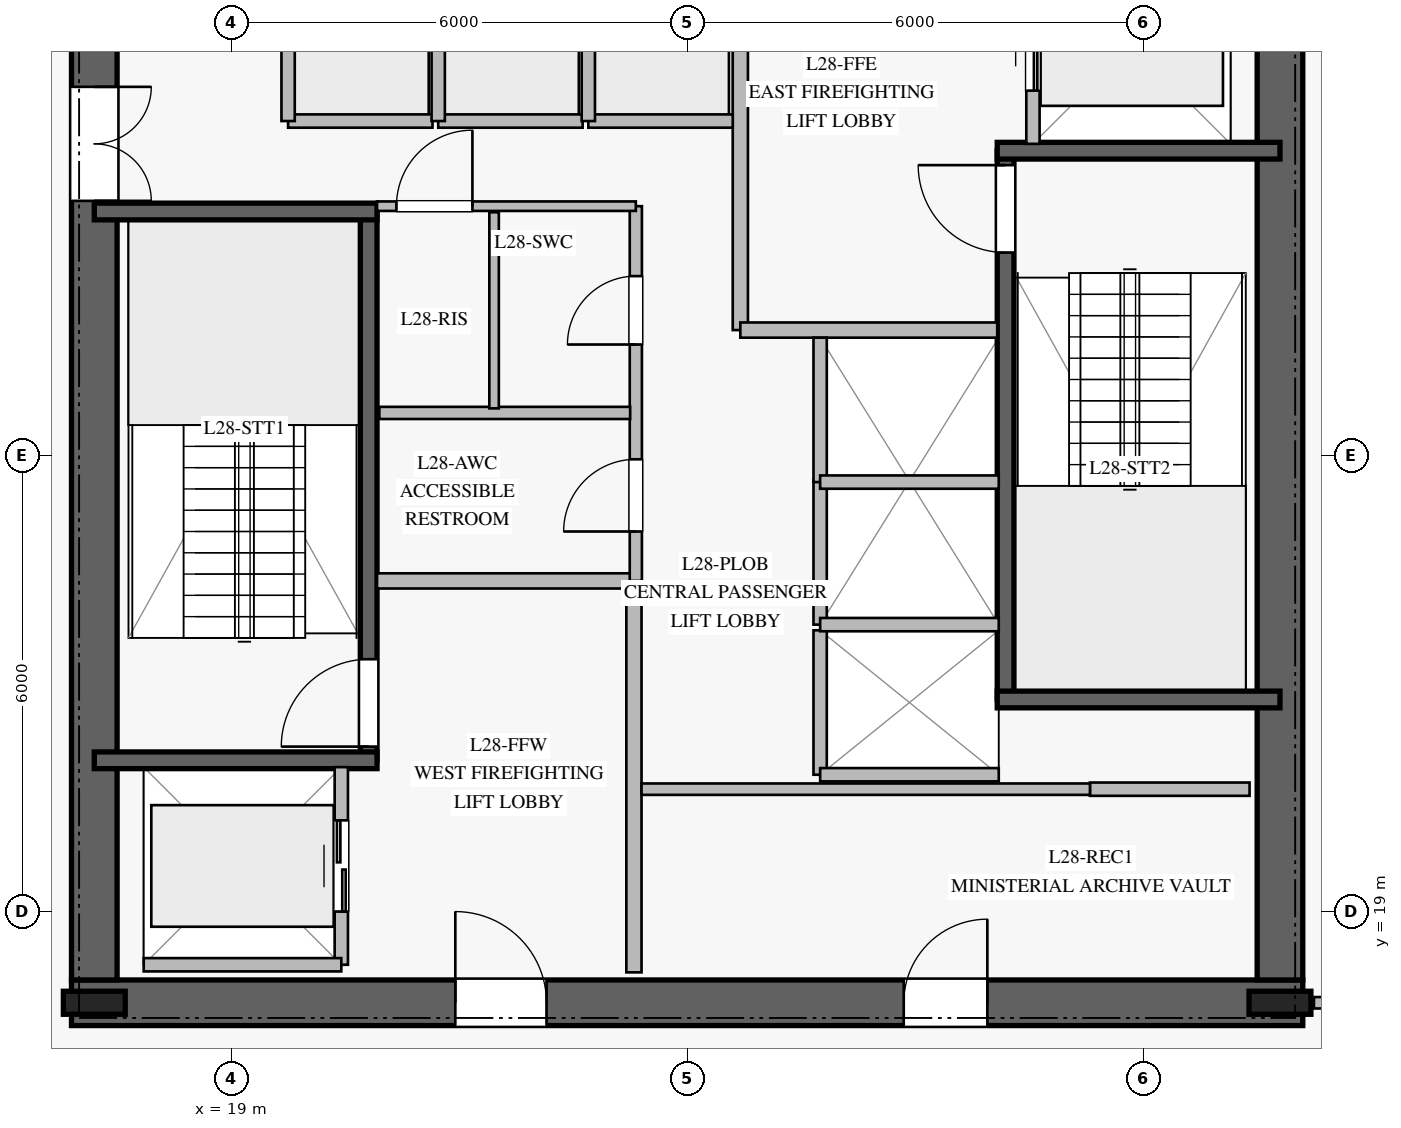
"""IFC4 building model, lengths in metres.
Left out: names, types, materials, properties, quantities, classifications, styles, units other than length and angle.
Written with IfcOpenShell. Run it as: python <this file> out.ifc"""

import sys

from ifc_helpers import new_model, si_unit, direction, frame, frame_2d, origin, origin_2d, place, context, subcontext, project, spatial, rectangle, i_section, extrude, element, fill, save


model = new_model("IFC4")
c1 = context("Model", 3, precision=1e-05, world=origin(), true_north=direction((0.0, 1.0)))
c2 = subcontext(c1, "Body", "Model", "MODEL_VIEW")
j1 = project(units=[si_unit("LENGTHUNIT", "METRE"), si_unit("PLANEANGLEUNIT", "RADIAN")], contexts=[c1])
p1 = place(None, origin())
s1 = spatial("IfcSite", under=j1, at=p1, CompositionType="ELEMENT")
p2 = place(p1, origin())
s2 = spatial("IfcBuilding", under=s1, at=p2, CompositionType="ELEMENT")
p3 = place(p2, frame((0.0, 0.0, 118.4)))
s3 = spatial("IfcBuildingStorey", under=s2, at=p3, CompositionType="ELEMENT", Elevation=118.4)
p4 = place(p3, frame((16.9, 17.8, 0.0), z_axis=(0.0, 0.0, 1.0), x_axis=(1.0, 0.0, 0.0)))
e1 = element("IfcWall", 1, at=p4, inside=s3, PredefinedType="SHEAR", context=c2, shape_type="SweptSolid", body=[
    extrude(rectangle(XDim=16.2, YDim=0.6, at=frame_2d((8.1, 0.0))), origin(), (0.0, 0.0, 1.0), 3.76),
])
p5 = place(p4, frame((5.05, 0.0, 0.0)))
e2 = element("IfcOpeningElement", 2, at=p5, cuts=e1, PredefinedType="OPENING", context=c2, shape_type="SweptSolid", body=[
    extrude(rectangle(XDim=1.2, YDim=2.25, at=frame_2d((0.6, 1.125))), frame((0.0, 0.31, 0.0), z_axis=(0.0, -1.0, 0.0), x_axis=(1.0, 0.0, 0.0)), (0.0, 0.0, 1.0), 0.62),
])
p6 = place(p4, frame((10.95, 0.0, 0.0)))
e3 = element("IfcOpeningElement", 3, at=p6, cuts=e1, PredefinedType="OPENING", context=c2, shape_type="SweptSolid", body=[
    extrude(rectangle(XDim=1.1, YDim=2.2, at=frame_2d((0.55, 1.1))), frame((0.0, 0.31, 0.0), z_axis=(0.0, -1.0, 0.0), x_axis=(1.0, 0.0, 0.0)), (0.0, 0.0, 1.0), 0.62),
])
p7 = place(p3, frame((17.2, 31.9, 0.0), z_axis=(0.0, 0.0, 1.0), x_axis=(0.0, -1.0, 0.0)))
e4 = element("IfcWall", 4, at=p7, inside=s3, PredefinedType="SHEAR", context=c2, shape_type="SweptSolid", body=[
    extrude(rectangle(XDim=13.8, YDim=0.6, at=frame_2d((6.9, 0.0))), origin(), (0.0, 0.0, 1.0), 3.76),
])
p8 = place(p7, frame((2.05, 0.0, 0.0)))
e5 = element("IfcOpeningElement", 5, at=p8, cuts=e4, PredefinedType="OPENING", context=c2, shape_type="SweptSolid", body=[
    extrude(rectangle(XDim=1.5, YDim=2.2, at=frame_2d((0.75, 1.1))), frame((0.0, 0.31, 0.0), z_axis=(0.0, -1.0, 0.0), x_axis=(1.0, 0.0, 0.0)), (0.0, 0.0, 1.0), 0.62),
])
p9 = place(p3, frame((32.8, 18.1, 0.0), z_axis=(0.0, 0.0, 1.0), x_axis=(0.0, 1.0, 0.0)))
e6 = element("IfcWall", 6, at=p9, inside=s3, PredefinedType="SHEAR", context=c2, shape_type="SweptSolid", body=[
    extrude(rectangle(XDim=13.8, YDim=0.6, at=frame_2d((6.9, 0.0))), origin(), (0.0, 0.0, 1.0), 3.76),
])
for number, where, z_axis, x_axis in (
    (7, (17.2, 17.8, 0.0), (0.0, 0.0, 1.0), (1.0, 0.0, 0.0)),
    (8, (32.8, 17.8, 0.0), (0.0, 0.0, 1.0), (1.0, 0.0, 0.0)),
):
    element("IfcColumn", number, at=place(p3, frame(where, z_axis=z_axis, x_axis=x_axis)), inside=s3, PredefinedType="COLUMN", context=c2, shape_type="SweptSolid", body=[
        extrude(i_section(OverallWidth=0.303, OverallDepth=0.814, WebThickness=0.021, FlangeThickness=0.04, at=origin_2d()), origin(), (0.0, 0.0, 1.0), 4.0),
    ])
p10 = place(p3, frame((20.81, 20.99, 0.0), z_axis=(0.0, 0.0, 1.0), x_axis=(0.0, 1.0, 0.0)))
e9 = element("IfcWall", 9, at=p10, inside=s3, PredefinedType="SOLIDWALL", context=c2, shape_type="SweptSolid", body=[
    extrude(rectangle(XDim=7.22, YDim=0.22, at=frame_2d((3.61, 0.0))), origin(), (0.0, 0.0, 1.0), 3.76),
])
p11 = place(p10, frame((0.18, 0.0, 0.0)))
e10 = element("IfcOpeningElement", 10, at=p11, cuts=e9, PredefinedType="OPENING", context=c2, shape_type="SweptSolid", body=[
    extrude(rectangle(XDim=1.15, YDim=2.2, at=frame_2d((0.575, 1.1))), frame((0.0, 0.12, 0.0), z_axis=(0.0, -1.0, 0.0), x_axis=(1.0, 0.0, 0.0)), (0.0, 0.0, 1.0), 0.24),
])
for number, where, z_axis, x_axis in (
    (11, (17.2, 20.99, 0.0), (0.0, 0.0, 1.0), (1.0, 0.0, 0.0)),
    (12, (17.2, 28.21, 0.0), (0.0, 0.0, 1.0), (1.0, 0.0, 0.0)),
):
    element("IfcWall", number, at=place(p3, frame(where, z_axis=z_axis, x_axis=x_axis)), inside=s3, PredefinedType="SOLIDWALL", context=c2, shape_type="SweptSolid", body=[
        extrude(rectangle(XDim=3.72, YDim=0.22, at=frame_2d((1.86, 0.0))), origin(), (0.0, 0.0, 1.0), 3.76),
    ])
p12 = place(p3, frame((29.19, 21.79, 0.0), z_axis=(0.0, 0.0, 1.0), x_axis=(0.0, 1.0, 0.0)))
e13 = element("IfcWall", 13, at=p12, inside=s3, PredefinedType="SOLIDWALL", context=c2, shape_type="SweptSolid", body=[
    extrude(rectangle(XDim=7.22, YDim=0.22, at=frame_2d((3.61, 0.0))), origin(), (0.0, 0.0, 1.0), 3.76),
])
p13 = place(p12, frame((5.88, 0.0, 0.0)))
e14 = element("IfcOpeningElement", 14, at=p13, cuts=e13, PredefinedType="OPENING", context=c2, shape_type="SweptSolid", body=[
    extrude(rectangle(XDim=1.15, YDim=2.2, at=frame_2d((0.575, 1.1))), frame((0.0, 0.12, 0.0), z_axis=(0.0, -1.0, 0.0), x_axis=(1.0, 0.0, 0.0)), (0.0, 0.0, 1.0), 0.24),
])
for number, where, z_axis, x_axis in (
    (15, (29.08, 21.79, 0.0), (0.0, 0.0, 1.0), (1.0, 0.0, 0.0)),
    (16, (29.08, 29.01, 0.0), (0.0, 0.0, 1.0), (1.0, 0.0, 0.0)),
):
    element("IfcWall", number, at=place(p3, frame(where, z_axis=z_axis, x_axis=x_axis)), inside=s3, PredefinedType="SOLIDWALL", context=c2, shape_type="SweptSolid", body=[
        extrude(rectangle(XDim=3.72, YDim=0.22, at=frame_2d((1.86, 0.0))), origin(), (0.0, 0.0, 1.0), 3.76),
    ])
p14 = place(p3, frame((24.3, 18.2, 0.0), z_axis=(0.0, 0.0, 1.0), x_axis=(0.0, 1.0, 0.0)))
e17 = element("IfcWall", 17, at=p14, inside=s3, PredefinedType="PARTITIONING", context=c2, shape_type="SweptSolid", body=[
    extrude(rectangle(XDim=5.15, YDim=0.2, at=frame_2d((2.575, 0.0))), origin(), (0.0, 0.0, 1.0), 3.76),
])
p15 = place(p3, frame((20.92, 23.35, 0.0), z_axis=(0.0, 0.0, 1.0), x_axis=(1.0, 0.0, 0.0)))
e18 = element("IfcWall", 18, at=p15, inside=s3, PredefinedType="PARTITIONING", context=c2, shape_type="SweptSolid", body=[
    extrude(rectangle(XDim=3.38, YDim=0.2, at=frame_2d((1.69, 0.0))), origin(), (0.0, 0.0, 1.0), 3.76),
])
p16 = place(p3, frame((25.7, 26.65, 0.0), z_axis=(0.0, 0.0, 1.0), x_axis=(0.0, 1.0, 0.0)))
e19 = element("IfcWall", 19, at=p16, inside=s3, PredefinedType="PARTITIONING", context=c2, shape_type="SweptSolid", body=[
    extrude(rectangle(XDim=5.15, YDim=0.2, at=frame_2d((2.575, 0.0))), origin(), (0.0, 0.0, 1.0), 3.76),
])
p17 = place(p3, frame((25.7, 26.65, 0.0), z_axis=(0.0, 0.0, 1.0), x_axis=(1.0, 0.0, 0.0)))
e20 = element("IfcWall", 20, at=p17, inside=s3, PredefinedType="PARTITIONING", context=c2, shape_type="SweptSolid", body=[
    extrude(rectangle(XDim=3.38, YDim=0.2, at=frame_2d((1.69, 0.0))), origin(), (0.0, 0.0, 1.0), 3.76),
])
p18 = place(p3, frame((24.325, 23.35, 0.0), z_axis=(0.0, 0.0, 1.0), x_axis=(0.0, 1.0, 0.0)))
e21 = element("IfcWall", 21, at=p18, inside=s3, PredefinedType="PLUMBINGWALL", context=c2, shape_type="SweptSolid", body=[
    extrude(rectangle(XDim=4.93, YDim=0.16, at=frame_2d((2.465, 0.0))), origin(), (0.0, 0.0, 1.0), 3.76),
])
p19 = place(p18, frame((0.65, 0.0, 0.0)))
e22 = element("IfcOpeningElement", 22, at=p19, cuts=e21, PredefinedType="OPENING", context=c2, shape_type="SweptSolid", body=[
    extrude(rectangle(XDim=0.95, YDim=2.1, at=frame_2d((0.475, 1.05))), frame((0.0, 0.09, 0.0), z_axis=(0.0, -1.0, 0.0), x_axis=(1.0, 0.0, 0.0)), (0.0, 0.0, 1.0), 0.18),
])
p20 = place(p18, frame((3.11, 0.0, 0.0)))
e23 = element("IfcOpeningElement", 23, at=p20, cuts=e21, PredefinedType="OPENING", context=c2, shape_type="SweptSolid", body=[
    extrude(rectangle(XDim=0.9, YDim=2.1, at=frame_2d((0.45, 1.05))), frame((0.0, 0.09, 0.0), z_axis=(0.0, -1.0, 0.0), x_axis=(1.0, 0.0, 0.0)), (0.0, 0.0, 1.0), 0.18),
])
p21 = place(p3, frame((20.92, 28.28, 0.0), z_axis=(0.0, 0.0, 1.0), x_axis=(1.0, 0.0, 0.0)))
e24 = element("IfcWall", 24, at=p21, inside=s3, PredefinedType="PARTITIONING", context=c2, shape_type="SweptSolid", body=[
    extrude(rectangle(XDim=3.405, YDim=0.125, at=frame_2d((1.703, 0.0))), origin(), (0.0, 0.0, 1.0), 3.76),
])
p22 = place(p21, frame((0.255, 0.0, 0.0)))
e25 = element("IfcOpeningElement", 25, at=p22, cuts=e24, PredefinedType="OPENING", context=c2, shape_type="SweptSolid", body=[
    extrude(rectangle(XDim=1.0, YDim=2.15, at=frame_2d((0.5, 1.075))), frame((0.0, 0.073, 0.0), z_axis=(0.0, -1.0, 0.0), x_axis=(1.0, 0.0, 0.0)), (0.0, 0.0, 1.0), 0.145),
])
p23 = place(p3, frame((20.95, 25.56, 0.0), z_axis=(0.0, 0.0, 1.0), x_axis=(1.0, 0.0, 0.0)))
e26 = element("IfcWall", 26, at=p23, inside=s3, PredefinedType="PLUMBINGWALL", context=c2, shape_type="SweptSolid", body=[
    extrude(rectangle(XDim=3.3, YDim=0.16, at=frame_2d((1.65, 0.0))), origin(), (0.0, 0.0, 1.0), 3.76),
])
p24 = place(p3, frame((22.46, 25.62, 0.0), z_axis=(0.0, 0.0, 1.0), x_axis=(0.0, 1.0, 0.0)))
e27 = element("IfcWall", 27, at=p24, inside=s3, PredefinedType="PARTITIONING", context=c2, shape_type="SweptSolid", body=[
    extrude(rectangle(XDim=2.58, YDim=0.125, at=frame_2d((1.29, 0.0))), origin(), (0.0, 0.0, 1.0), 3.76),
])
p25 = place(p3, frame((30.3, 20.61, 0.0), z_axis=(0.0, 0.0, 1.0), x_axis=(1.0, 0.0, 0.0)))
e28 = element("IfcWall", 28, at=p25, inside=s3, PredefinedType="PARTITIONING", context=c2, shape_type="SweptSolid", body=[
    extrude(rectangle(XDim=2.1, YDim=0.175, at=frame_2d((1.05, 0.0))), origin(), (0.0, 0.0, 1.0), 3.76),
])
p26 = place(p3, frame((24.4, 20.61, 0.0), z_axis=(0.0, 0.0, 1.0), x_axis=(1.0, 0.0, 0.0)))
e29 = element("IfcWall", 29, at=p26, inside=s3, PredefinedType="PARTITIONING", context=c2, shape_type="SweptSolid", body=[
    extrude(rectangle(XDim=5.9, YDim=0.15, at=frame_2d((2.95, 0.0))), origin(), (0.0, 0.0, 1.0), 3.76),
])
p27 = place(p3, frame((19.75, 29.4, 0.0), z_axis=(0.0, 0.0, 1.0), x_axis=(1.0, 0.0, 0.0)))
e30 = element("IfcWall", 30, at=p27, inside=s3, PredefinedType="PARTITIONING", context=c2, shape_type="SweptSolid", body=[
    extrude(rectangle(XDim=1.9, YDim=0.175, at=frame_2d((0.95, 0.0))), origin(), (0.0, 0.0, 1.0), 3.76),
])
p28 = place(p3, frame((19.75, 29.4, 0.0), z_axis=(0.0, 0.0, 1.0), x_axis=(0.0, 1.0, 0.0)))
e31 = element("IfcWall", 31, at=p28, inside=s3, PredefinedType="PARTITIONING", context=c2, shape_type="SweptSolid", body=[
    extrude(rectangle(XDim=2.35, YDim=0.175, at=frame_2d((1.175, 0.0))), origin(), (0.0, 0.0, 1.0), 3.76),
])
p29 = place(p3, frame((21.725, 29.4, 0.0), z_axis=(0.0, 0.0, 1.0), x_axis=(1.0, 0.0, 0.0)))
e32 = element("IfcWall", 32, at=p29, inside=s3, PredefinedType="PARTITIONING", context=c2, shape_type="SweptSolid", body=[
    extrude(rectangle(XDim=1.9, YDim=0.175, at=frame_2d((0.95, 0.0))), origin(), (0.0, 0.0, 1.0), 3.76),
])
p30 = place(p3, frame((21.725, 29.4, 0.0), z_axis=(0.0, 0.0, 1.0), x_axis=(0.0, 1.0, 0.0)))
e33 = element("IfcWall", 33, at=p30, inside=s3, PredefinedType="PARTITIONING", context=c2, shape_type="SweptSolid", body=[
    extrude(rectangle(XDim=2.35, YDim=0.175, at=frame_2d((1.175, 0.0))), origin(), (0.0, 0.0, 1.0), 3.76),
])
p31 = place(p3, frame((23.7, 29.4, 0.0), z_axis=(0.0, 0.0, 1.0), x_axis=(1.0, 0.0, 0.0)))
e34 = element("IfcWall", 34, at=p31, inside=s3, PredefinedType="PARTITIONING", context=c2, shape_type="SweptSolid", body=[
    extrude(rectangle(XDim=1.9, YDim=0.175, at=frame_2d((0.95, 0.0))), origin(), (0.0, 0.0, 1.0), 3.76),
])
p32 = place(p3, frame((23.7, 29.4, 0.0), z_axis=(0.0, 0.0, 1.0), x_axis=(0.0, 1.0, 0.0)))
e35 = element("IfcWall", 35, at=p32, inside=s3, PredefinedType="PARTITIONING", context=c2, shape_type="SweptSolid", body=[
    extrude(rectangle(XDim=2.35, YDim=0.175, at=frame_2d((1.175, 0.0))), origin(), (0.0, 0.0, 1.0), 3.76),
])
p33 = place(p3, frame((26.75, 20.8, 0.0), z_axis=(0.0, 0.0, 1.0), x_axis=(0.0, 1.0, 0.0)))
e36 = element("IfcWall", 36, at=p33, inside=s3, PredefinedType="PARTITIONING", context=c2, shape_type="SweptSolid", body=[
    extrude(rectangle(XDim=1.9, YDim=0.175, at=frame_2d((0.95, 0.0))), origin(), (0.0, 0.0, 1.0), 3.76),
])
p34 = place(p3, frame((26.75, 20.8, 0.0), z_axis=(0.0, 0.0, 1.0), x_axis=(1.0, 0.0, 0.0)))
e37 = element("IfcWall", 37, at=p34, inside=s3, PredefinedType="PARTITIONING", context=c2, shape_type="SweptSolid", body=[
    extrude(rectangle(XDim=2.35, YDim=0.175, at=frame_2d((1.175, 0.0))), origin(), (0.0, 0.0, 1.0), 3.76),
])
p35 = place(p3, frame((26.75, 22.775, 0.0), z_axis=(0.0, 0.0, 1.0), x_axis=(0.0, 1.0, 0.0)))
e38 = element("IfcWall", 38, at=p35, inside=s3, PredefinedType="PARTITIONING", context=c2, shape_type="SweptSolid", body=[
    extrude(rectangle(XDim=1.9, YDim=0.175, at=frame_2d((0.95, 0.0))), origin(), (0.0, 0.0, 1.0), 3.76),
])
p36 = place(p3, frame((26.75, 22.775, 0.0), z_axis=(0.0, 0.0, 1.0), x_axis=(1.0, 0.0, 0.0)))
e39 = element("IfcWall", 39, at=p36, inside=s3, PredefinedType="PARTITIONING", context=c2, shape_type="SweptSolid", body=[
    extrude(rectangle(XDim=2.35, YDim=0.175, at=frame_2d((1.175, 0.0))), origin(), (0.0, 0.0, 1.0), 3.76),
])
p37 = place(p3, frame((26.75, 24.65, 0.0), z_axis=(0.0, 0.0, 1.0), x_axis=(0.0, 1.0, 0.0)))
e40 = element("IfcWall", 40, at=p37, inside=s3, PredefinedType="PARTITIONING", context=c2, shape_type="SweptSolid", body=[
    extrude(rectangle(XDim=1.9, YDim=0.175, at=frame_2d((0.95, 0.0))), origin(), (0.0, 0.0, 1.0), 3.76),
])
p38 = place(p3, frame((26.75, 24.65, 0.0), z_axis=(0.0, 0.0, 1.0), x_axis=(1.0, 0.0, 0.0)))
e41 = element("IfcWall", 41, at=p38, inside=s3, PredefinedType="PARTITIONING", context=c2, shape_type="SweptSolid", body=[
    extrude(rectangle(XDim=2.35, YDim=0.175, at=frame_2d((1.175, 0.0))), origin(), (0.0, 0.0, 1.0), 3.76),
])
p39 = place(p3, frame((20.45, 18.3, 0.0), z_axis=(0.0, 0.0, 1.0), x_axis=(0.0, 1.0, 0.0)))
e42 = element("IfcWall", 42, at=p39, inside=s3, PredefinedType="PARTITIONING", context=c2, shape_type="SweptSolid", body=[
    extrude(rectangle(XDim=2.6, YDim=0.175, at=frame_2d((1.3, 0.0))), origin(), (0.0, 0.0, 1.0), 3.76),
])
p40 = place(p39, frame((0.7, 0.0, 0.0)))
e43 = element("IfcOpeningElement", 43, at=p40, cuts=e42, PredefinedType="OPENING", context=c2, shape_type="SweptSolid", body=[
    extrude(rectangle(XDim=1.2, YDim=2.2, at=frame_2d((0.6, 1.1))), frame((0.0, 0.098, 0.0), z_axis=(0.0, -1.0, 0.0), x_axis=(1.0, 0.0, 0.0)), (0.0, 0.0, 1.0), 0.195),
])
p41 = place(p3, frame((17.85, 18.3, 0.0), z_axis=(0.0, 0.0, 1.0), x_axis=(1.0, 0.0, 0.0)))
e44 = element("IfcWall", 44, at=p41, inside=s3, PredefinedType="PARTITIONING", context=c2, shape_type="SweptSolid", body=[
    extrude(rectangle(XDim=2.6, YDim=0.175, at=frame_2d((1.3, 0.0))), origin(), (0.0, 0.0, 1.0), 3.76),
])
p42 = place(p3, frame((29.55, 29.1, 0.0), z_axis=(0.0, 0.0, 1.0), x_axis=(0.0, 1.0, 0.0)))
e45 = element("IfcWall", 45, at=p42, inside=s3, PredefinedType="PARTITIONING", context=c2, shape_type="SweptSolid", body=[
    extrude(rectangle(XDim=2.6, YDim=0.175, at=frame_2d((1.3, 0.0))), origin(), (0.0, 0.0, 1.0), 3.76),
])
p43 = place(p42, frame((0.7, 0.0, 0.0)))
e46 = element("IfcOpeningElement", 46, at=p43, cuts=e45, PredefinedType="OPENING", context=c2, shape_type="SweptSolid", body=[
    extrude(rectangle(XDim=1.2, YDim=2.2, at=frame_2d((0.6, 1.1))), frame((0.0, 0.098, 0.0), z_axis=(0.0, -1.0, 0.0), x_axis=(1.0, 0.0, 0.0)), (0.0, 0.0, 1.0), 0.195),
])
p44 = place(p3, frame((33.247, 17.8, 0.0), z_axis=(0.0, 0.0, 1.0), x_axis=(1.0, 0.0, 0.0)))
e47 = element("IfcWall", 47, at=p44, inside=s3, PredefinedType="PARTITIONING", context=c2, shape_type="SweptSolid", body=[
    extrude(rectangle(XDim=7.953, YDim=0.15, at=frame_2d((3.977, 0.0))), origin(), (0.0, 0.0, 1.0), 3.21),
])
p45 = place(p11, origin())
e48 = element("IfcDoor", 48, at=p45, inside=s3, OperationType="SINGLE_SWING_LEFT", PredefinedType="DOOR", context=c2, shape_type="SweptSolid", body=[
    extrude(rectangle(XDim=1.15, YDim=2.2, at=frame_2d((0.575, 1.1))), frame((0.0, 0.025, 0.0), z_axis=(0.0, -1.0, 0.0), x_axis=(1.0, 0.0, 0.0)), (0.0, 0.0, 1.0), 0.05),
])
fill(e10, e48)
p46 = place(p13, origin())
e49 = element("IfcDoor", 49, at=p46, inside=s3, OperationType="SINGLE_SWING_RIGHT", PredefinedType="DOOR", context=c2, shape_type="SweptSolid", body=[
    extrude(rectangle(XDim=1.15, YDim=2.2, at=frame_2d((0.575, 1.1))), frame((0.0, 0.025, 0.0), z_axis=(0.0, -1.0, 0.0), x_axis=(1.0, 0.0, 0.0)), (0.0, 0.0, 1.0), 0.05),
])
fill(e14, e49)
p47 = place(p5, origin())
e50 = element("IfcDoor", 50, at=p47, inside=s3, OperationType="SINGLE_SWING_LEFT", PredefinedType="DOOR", context=c2, shape_type="SweptSolid", body=[
    extrude(rectangle(XDim=1.2, YDim=2.25, at=frame_2d((0.6, 1.125))), frame((0.0, 0.025, 0.0), z_axis=(0.0, -1.0, 0.0), x_axis=(1.0, 0.0, 0.0)), (0.0, 0.0, 1.0), 0.05),
])
fill(e2, e50)
p48 = place(p8, origin())
e51 = element("IfcDoor", 51, at=p48, inside=s3, OperationType="DOUBLE_DOOR_SINGLE_SWING", PredefinedType="DOOR", context=c2, shape_type="SweptSolid", body=[
    extrude(rectangle(XDim=1.5, YDim=2.2, at=frame_2d((0.75, 1.1))), frame((0.0, 0.025, 0.0), z_axis=(0.0, -1.0, 0.0), x_axis=(1.0, 0.0, 0.0)), (0.0, 0.0, 1.0), 0.05),
])
fill(e5, e51)
p49 = place(p19, origin())
e52 = element("IfcDoor", 52, at=p49, inside=s3, OperationType="SINGLE_SWING_LEFT", PredefinedType="DOOR", context=c2, shape_type="SweptSolid", body=[
    extrude(rectangle(XDim=0.95, YDim=2.1, at=frame_2d((0.475, 1.05))), frame((0.0, 0.025, 0.0), z_axis=(0.0, -1.0, 0.0), x_axis=(1.0, 0.0, 0.0)), (0.0, 0.0, 1.0), 0.05),
])
fill(e22, e52)
p50 = place(p22, origin())
e53 = element("IfcDoor", 53, at=p50, inside=s3, OperationType="SINGLE_SWING_RIGHT", PredefinedType="DOOR", context=c2, shape_type="SweptSolid", body=[
    extrude(rectangle(XDim=1.0, YDim=2.15, at=frame_2d((0.5, 1.075))), frame((0.0, 0.025, 0.0), z_axis=(0.0, -1.0, 0.0), x_axis=(1.0, 0.0, 0.0)), (0.0, 0.0, 1.0), 0.05),
])
fill(e25, e53)
p51 = place(p20, origin())
e54 = element("IfcDoor", 54, at=p51, inside=s3, OperationType="SINGLE_SWING_LEFT", PredefinedType="DOOR", context=c2, shape_type="SweptSolid", body=[
    extrude(rectangle(XDim=0.9, YDim=2.1, at=frame_2d((0.45, 1.05))), frame((0.0, 0.025, 0.0), z_axis=(0.0, -1.0, 0.0), x_axis=(1.0, 0.0, 0.0)), (0.0, 0.0, 1.0), 0.05),
])
fill(e23, e54)
p52 = place(p6, origin())
e55 = element("IfcDoor", 55, at=p52, inside=s3, OperationType="SINGLE_SWING_RIGHT", PredefinedType="DOOR", context=c2, shape_type="SweptSolid", body=[
    extrude(rectangle(XDim=1.1, YDim=2.2, at=frame_2d((0.55, 1.1))), frame((0.0, 0.025, 0.0), z_axis=(0.0, -1.0, 0.0), x_axis=(1.0, 0.0, 0.0)), (0.0, 0.0, 1.0), 0.05),
])
fill(e3, e55)
p53 = place(p40, origin())
e56 = element("IfcDoor", 56, at=p53, inside=s3, OperationType="DOUBLE_DOOR_SLIDING", PredefinedType="DOOR", context=c2, shape_type="SweptSolid", body=[
    extrude(rectangle(XDim=1.2, YDim=2.2, at=frame_2d((0.6, 1.1))), frame((0.0, 0.025, 0.0), z_axis=(0.0, -1.0, 0.0), x_axis=(1.0, 0.0, 0.0)), (0.0, 0.0, 1.0), 0.05),
])
fill(e43, e56)
p54 = place(p43, origin())
e57 = element("IfcDoor", 57, at=p54, inside=s3, OperationType="DOUBLE_DOOR_SLIDING", PredefinedType="DOOR", context=c2, shape_type="SweptSolid", body=[
    extrude(rectangle(XDim=1.2, YDim=2.2, at=frame_2d((0.6, 1.1))), frame((0.0, 0.025, 0.0), z_axis=(0.0, -1.0, 0.0), x_axis=(1.0, 0.0, 0.0)), (0.0, 0.0, 1.0), 0.05),
])
fill(e46, e57)
save(model, sys.argv[1])
